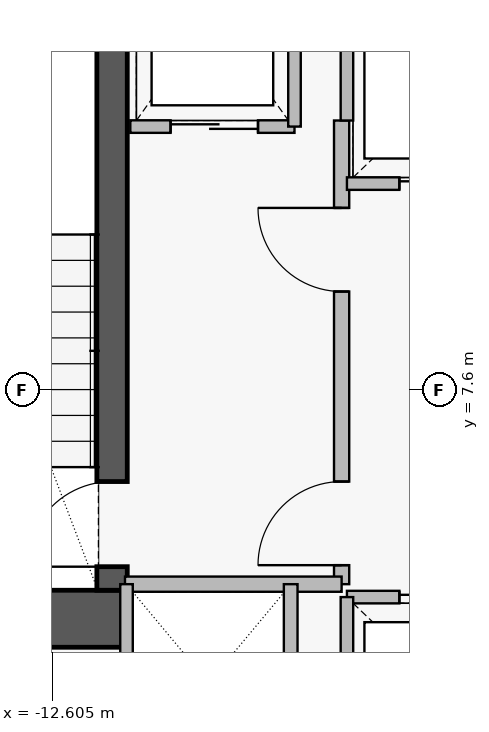
"""IFC4 building model, lengths in metres.
Left out: names, types, materials, properties, quantities, classifications, styles, units other than length and angle.
Written with IfcOpenShell. Run it as: python <this file> out.ifc"""

import sys

from ifc_helpers import new_model, si_unit, direction, frame, frame_2d, origin, place, context, subcontext, project, spatial, rectangle, extrude, element, fill, save


model = new_model("IFC4")
c1 = context("Model", 3, precision=1e-05, world=origin(), true_north=direction((0.0, 1.0)))
c2 = subcontext(c1, "Body", "Model", "MODEL_VIEW")
j1 = project(units=[si_unit("LENGTHUNIT", "METRE"), si_unit("PLANEANGLEUNIT", "RADIAN")], contexts=[c1])
p1 = place(None, origin())
s1 = spatial("IfcSite", under=j1, at=p1, CompositionType="ELEMENT")
p2 = place(p1, origin())
s2 = spatial("IfcBuilding", under=s1, at=p2, CompositionType="ELEMENT")
p3 = place(p2, frame((0.0, 0.0, 128.5)))
s3 = spatial("IfcBuildingStorey", under=s2, at=p3, CompositionType="ELEMENT", Elevation=128.5)
p4 = place(p3, frame((-16.16, 4.595, 0.0), z_axis=(0.0, 0.0, 1.0), x_axis=(1.0, 0.0, 0.0)))
e1 = element("IfcWall", 1, at=p4, inside=s3, PredefinedType="SHEAR", context=c2, shape_type="SweptSolid", body=[
    extrude(rectangle(XDim=4.56, YDim=0.75, at=frame_2d((2.28, 0.0))), origin(), (0.0, 0.0, 1.0), 3.46),
])
p5 = place(p3, frame((-11.82, 4.97, 0.0), z_axis=(0.0, 0.0, 1.0), x_axis=(0.0, 1.0, 0.0)))
e2 = element("IfcWall", 2, at=p5, inside=s3, PredefinedType="SHEAR", context=c2, shape_type="SweptSolid", body=[
    extrude(rectangle(XDim=8.96, YDim=0.4, at=frame_2d((4.48, 0.0))), origin(), (0.0, 0.0, 1.0), 3.46),
])
p6 = place(p5, frame((0.31, 0.0, 0.0)))
e3 = element("IfcOpeningElement", 3, at=p6, cuts=e2, PredefinedType="OPENING", context=c2, shape_type="SweptSolid", body=[
    extrude(rectangle(XDim=1.12, YDim=2.22, at=frame_2d((0.56, 1.11))), frame((0.0, 0.21, 0.0), z_axis=(0.0, -1.0, 0.0), x_axis=(1.0, 0.0, 0.0)), (0.0, 0.0, 1.0), 0.42),
])
p7 = place(p3, frame((-8.8, 5.05, 0.0), z_axis=(0.0, 0.0, 1.0), x_axis=(0.0, 1.0, 0.0)))
e4 = element("IfcWall", 4, at=p7, inside=s3, PredefinedType="PARTITIONING", context=c2, shape_type="SweptSolid", body=[
    extrude(rectangle(XDim=6.1, YDim=0.2, at=frame_2d((3.05, 0.0))), origin(), (0.0, 0.0, 1.0), 3.43),
])
p8 = place(p7, frame((0.25, 0.0, 0.0)))
e5 = element("IfcOpeningElement", 5, at=p8, cuts=e4, PredefinedType="OPENING", context=c2, shape_type="SweptSolid", body=[
    extrude(rectangle(XDim=1.1, YDim=2.2, at=frame_2d((0.55, 1.1))), frame((0.0, 0.11, 0.0), z_axis=(0.0, -1.0, 0.0), x_axis=(1.0, 0.0, 0.0)), (0.0, 0.0, 1.0), 0.22),
])
p9 = place(p7, frame((3.85, 0.0, 0.0)))
e6 = element("IfcOpeningElement", 6, at=p9, cuts=e4, PredefinedType="OPENING", context=c2, shape_type="SweptSolid", body=[
    extrude(rectangle(XDim=1.1, YDim=2.2, at=frame_2d((0.55, 1.1))), frame((0.0, 0.11, 0.0), z_axis=(0.0, -1.0, 0.0), x_axis=(1.0, 0.0, 0.0)), (0.0, 0.0, 1.0), 0.22),
])
p10 = place(p3, frame((-11.58, 11.07, 0.0), z_axis=(0.0, 0.0, 1.0), x_axis=(1.0, 0.0, 0.0)))
e7 = element("IfcWall", 7, at=p10, inside=s3, PredefinedType="PARTITIONING", context=c2, shape_type="SweptSolid", body=[
    extrude(rectangle(XDim=2.16, YDim=0.165, at=frame_2d((1.08, 0.0))), origin(), (0.0, 0.0, 1.0), 3.43),
])
p11 = place(p10, frame((0.53, 0.0, 0.0)))
e8 = element("IfcOpeningElement", 8, at=p11, cuts=e7, PredefinedType="OPENING", context=c2, shape_type="SweptSolid", body=[
    extrude(rectangle(XDim=1.15, YDim=2.25, at=frame_2d((0.575, 1.125))), frame((0.0, 0.093, 0.0), z_axis=(0.0, -1.0, 0.0), x_axis=(1.0, 0.0, 0.0)), (0.0, 0.0, 1.0), 0.185),
])
p12 = place(p3, frame((-8.73, 4.88, 0.0), z_axis=(0.0, 0.0, 1.0), x_axis=(1.0, 0.0, 0.0)))
e9 = element("IfcWall", 9, at=p12, inside=s3, PredefinedType="PARTITIONING", context=c2, shape_type="SweptSolid", body=[
    extrude(rectangle(XDim=2.48, YDim=0.165, at=frame_2d((1.24, 0.0))), origin(), (0.0, 0.0, 1.0), 3.43),
])
p13 = place(p12, frame((0.69, 0.0, 0.0)))
e10 = element("IfcOpeningElement", 10, at=p13, cuts=e9, PredefinedType="OPENING", context=c2, shape_type="SweptSolid", body=[
    extrude(rectangle(XDim=1.1, YDim=2.25, at=frame_2d((0.55, 1.125))), frame((0.0, 0.093, 0.0), z_axis=(0.0, -1.0, 0.0), x_axis=(1.0, 0.0, 0.0)), (0.0, 0.0, 1.0), 0.185),
])
p14 = place(p3, frame((-8.73, 10.32, 0.0), z_axis=(0.0, 0.0, 1.0), x_axis=(1.0, 0.0, 0.0)))
e11 = element("IfcWall", 11, at=p14, inside=s3, PredefinedType="PARTITIONING", context=c2, shape_type="SweptSolid", body=[
    extrude(rectangle(XDim=2.48, YDim=0.165, at=frame_2d((1.24, 0.0))), origin(), (0.0, 0.0, 1.0), 3.43),
])
p15 = place(p14, frame((0.69, 0.0, 0.0)))
e12 = element("IfcOpeningElement", 12, at=p15, cuts=e11, PredefinedType="OPENING", context=c2, shape_type="SweptSolid", body=[
    extrude(rectangle(XDim=1.1, YDim=2.25, at=frame_2d((0.55, 1.125))), frame((0.0, 0.093, 0.0), z_axis=(0.0, -1.0, 0.0), x_axis=(1.0, 0.0, 0.0)), (0.0, 0.0, 1.0), 0.185),
])
p16 = place(p3, frame((-11.65, 5.05, 0.0), z_axis=(0.0, 0.0, 1.0), x_axis=(1.0, 0.0, 0.0)))
e13 = element("IfcWall", 13, at=p16, inside=s3, PredefinedType="PARTITIONING", context=c2, shape_type="SweptSolid", body=[
    extrude(rectangle(XDim=2.85, YDim=0.2, at=frame_2d((1.425, 0.0))), origin(), (0.0, 0.0, 1.0), 3.43),
])
p17 = place(p3, frame((-9.42, 11.07, 0.0), z_axis=(0.0, 0.0, 1.0), x_axis=(0.0, 1.0, 0.0)))
e14 = element("IfcWall", 14, at=p17, inside=s3, PredefinedType="PARTITIONING", context=c2, shape_type="SweptSolid", body=[
    extrude(rectangle(XDim=2.96, YDim=0.165, at=frame_2d((1.48, 0.0))), origin(), (0.0, 0.0, 1.0), 3.43),
])
p18 = place(p3, frame((-8.73, 2.52, 0.0), z_axis=(0.0, 0.0, 1.0), x_axis=(0.0, 1.0, 0.0)))
e15 = element("IfcWall", 15, at=p18, inside=s3, PredefinedType="PARTITIONING", context=c2, shape_type="SweptSolid", body=[
    extrude(rectangle(XDim=2.36, YDim=0.165, at=frame_2d((1.18, 0.0))), origin(), (0.0, 0.0, 1.0), 3.43),
])
p19 = place(p3, frame((-8.73, 11.15, 0.0), z_axis=(0.0, 0.0, 1.0), x_axis=(0.0, 1.0, 0.0)))
e16 = element("IfcWall", 16, at=p19, inside=s3, PredefinedType="PARTITIONING", context=c2, shape_type="SweptSolid", body=[
    extrude(rectangle(XDim=1.53, YDim=0.165, at=frame_2d((0.765, 0.0))), origin(), (0.0, 0.0, 1.0), 3.43),
])
p20 = place(p3, frame((-9.47, 2.45, 0.0), z_axis=(0.0, 0.0, 1.0), x_axis=(0.0, 1.0, 0.0)))
e17 = element("IfcWall", 17, at=p20, inside=s3, PredefinedType="PARTITIONING", context=c2, shape_type="SweptSolid", body=[
    extrude(rectangle(XDim=2.6, YDim=0.18, at=frame_2d((1.3, 0.0))), origin(), (0.0, 0.0, 1.0), 3.43),
])
p21 = place(p3, frame((-11.63, 2.47, 0.0), z_axis=(0.0, 0.0, 1.0), x_axis=(0.0, 1.0, 0.0)))
e18 = element("IfcWall", 18, at=p21, inside=s3, PredefinedType="PARTITIONING", context=c2, shape_type="SweptSolid", body=[
    extrude(rectangle(XDim=2.58, YDim=0.165, at=frame_2d((1.29, 0.0))), origin(), (0.0, 0.0, 1.0), 3.43),
])
p22 = place(p6, origin())
e19 = element("IfcDoor", 19, at=p22, inside=s3, OperationType="SINGLE_SWING_LEFT", PredefinedType="DOOR", context=c2, shape_type="SweptSolid", body=[
    extrude(rectangle(XDim=1.12, YDim=2.22, at=frame_2d((0.56, 1.11))), frame((0.0, 0.025, 0.0), z_axis=(0.0, -1.0, 0.0), x_axis=(1.0, 0.0, 0.0)), (0.0, 0.0, 1.0), 0.05),
])
fill(e3, e19)
p23 = place(p8, origin())
e20 = element("IfcDoor", 20, at=p23, inside=s3, OperationType="SINGLE_SWING_LEFT", PredefinedType="DOOR", context=c2, shape_type="SweptSolid", body=[
    extrude(rectangle(XDim=1.1, YDim=2.2, at=frame_2d((0.55, 1.1))), frame((0.0, 0.025, 0.0), z_axis=(0.0, -1.0, 0.0), x_axis=(1.0, 0.0, 0.0)), (0.0, 0.0, 1.0), 0.05),
])
fill(e5, e20)
p24 = place(p9, origin())
e21 = element("IfcDoor", 21, at=p24, inside=s3, OperationType="SINGLE_SWING_RIGHT", PredefinedType="DOOR", context=c2, shape_type="SweptSolid", body=[
    extrude(rectangle(XDim=1.1, YDim=2.2, at=frame_2d((0.55, 1.1))), frame((0.0, 0.025, 0.0), z_axis=(0.0, -1.0, 0.0), x_axis=(1.0, 0.0, 0.0)), (0.0, 0.0, 1.0), 0.05),
])
fill(e6, e21)
p25 = place(p11, origin())
e22 = element("IfcDoor", 22, at=p25, inside=s3, OperationType="SLIDING_TO_LEFT", PredefinedType="DOOR", context=c2, shape_type="SweptSolid", body=[
    extrude(rectangle(XDim=1.15, YDim=2.25, at=frame_2d((0.575, 1.125))), frame((0.0, 0.025, 0.0), z_axis=(0.0, -1.0, 0.0), x_axis=(1.0, 0.0, 0.0)), (0.0, 0.0, 1.0), 0.05),
])
fill(e8, e22)
p26 = place(p13, origin())
e23 = element("IfcDoor", 23, at=p26, inside=s3, OperationType="SLIDING_TO_LEFT", PredefinedType="DOOR", context=c2, shape_type="SweptSolid", body=[
    extrude(rectangle(XDim=1.1, YDim=2.25, at=frame_2d((0.55, 1.125))), frame((0.0, 0.025, 0.0), z_axis=(0.0, -1.0, 0.0), x_axis=(1.0, 0.0, 0.0)), (0.0, 0.0, 1.0), 0.05),
])
fill(e10, e23)
p27 = place(p15, origin())
e24 = element("IfcDoor", 24, at=p27, inside=s3, OperationType="SLIDING_TO_LEFT", PredefinedType="DOOR", context=c2, shape_type="SweptSolid", body=[
    extrude(rectangle(XDim=1.1, YDim=2.25, at=frame_2d((0.55, 1.125))), frame((0.0, 0.025, 0.0), z_axis=(0.0, -1.0, 0.0), x_axis=(1.0, 0.0, 0.0)), (0.0, 0.0, 1.0), 0.05),
])
fill(e12, e24)
save(model, sys.argv[1])
